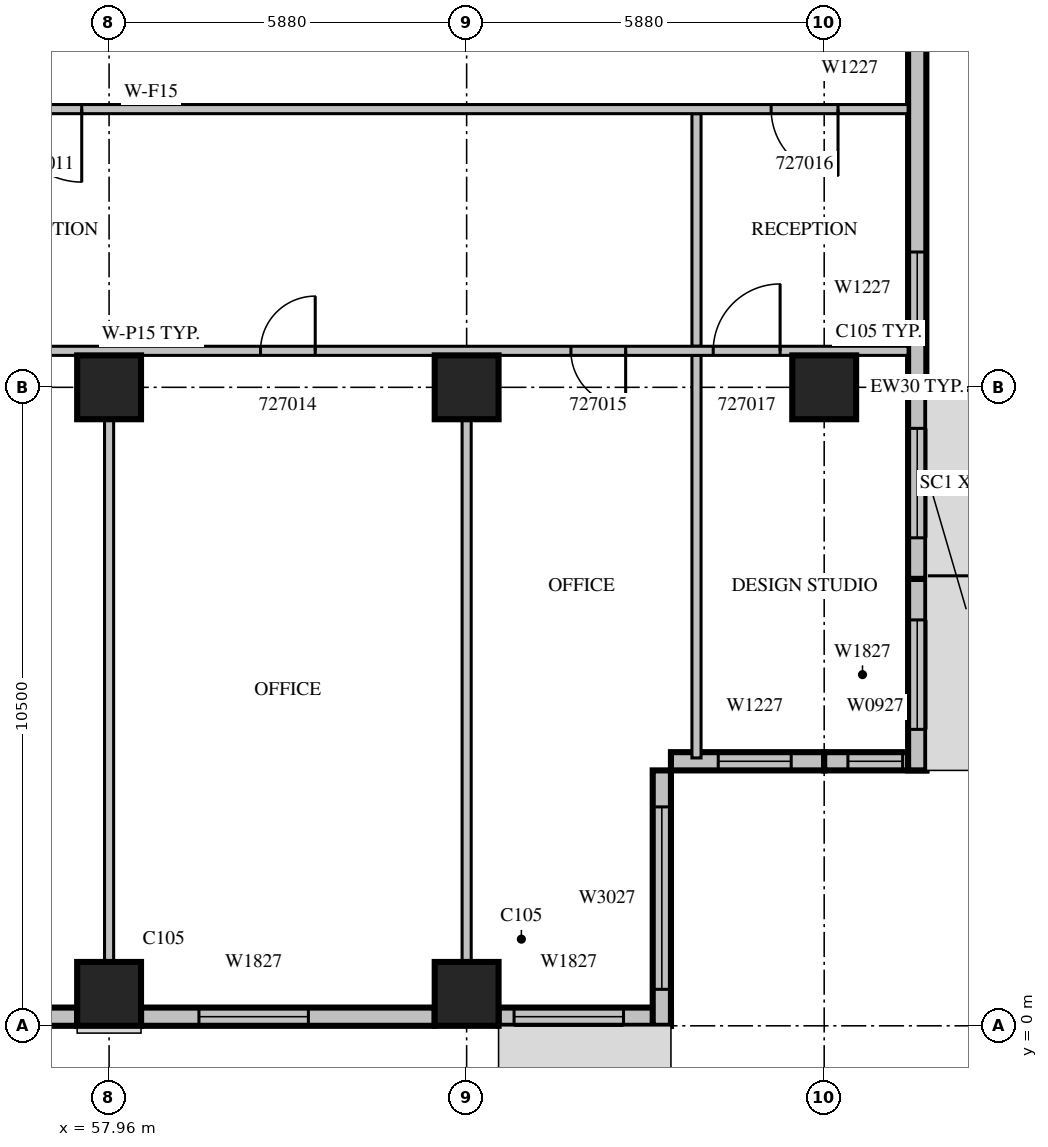
"""IFC4 building model, lengths in metres.
Left out: names, types, materials, properties, quantities, classifications, styles, units other than length and angle.
Written with IfcOpenShell. Run it as: python <this file> out.ifc"""

import sys

from ifc_helpers import new_model, si_unit, direction, frame, frame_2d, origin, origin_2d, place, context, subcontext, project, spatial, rectangle, extrude, source, transform, mapped, element, fill, save


model = new_model("IFC4")
c1 = context("Model", 3, precision=1e-05, world=origin(), true_north=direction((0.0, 1.0)))
c2 = subcontext(c1, "Body", "Model", "MODEL_VIEW")
j1 = project(units=[si_unit("LENGTHUNIT", "METRE"), si_unit("PLANEANGLEUNIT", "RADIAN")], contexts=[c1])
p1 = place(None, origin())
s1 = spatial("IfcSite", under=j1, at=p1, CompositionType="ELEMENT")
p2 = place(p1, origin())
s2 = spatial("IfcBuilding", under=s1, at=p2, CompositionType="ELEMENT")
p3 = place(p2, frame((0.0, 0.0, 124.5)))
s3 = spatial("IfcBuildingStorey", under=s2, at=p3, CompositionType="ELEMENT", Elevation=124.5)
m1 = source(origin(), c2, "Body", "SweptSolid", [
    extrude(rectangle(XDim=1.05, YDim=1.05, at=origin_2d()), origin(), (0.0, 0.0, 1.0), 4.2),
])
for number, where, z_axis, x_axis in (
    (1, (57.96, 0.525, 0.0), (0.0, 0.0, 1.0), (1.0, 0.0, 0.0)),
    (2, (63.84, 0.525, 0.0), (0.0, 0.0, 1.0), (1.0, 0.0, 0.0)),
    (3, (57.96, 10.5, 0.0), (0.0, 0.0, 1.0), (1.0, 0.0, 0.0)),
    (4, (63.84, 10.5, 0.0), (0.0, 0.0, 1.0), (1.0, 0.0, 0.0)),
    (5, (69.72, 10.5, 0.0), (0.0, 0.0, 1.0), (1.0, 0.0, 0.0)),
):
    element("IfcColumn", number, at=place(p3, frame(where, z_axis=z_axis, x_axis=x_axis)), inside=s3, PredefinedType="COLUMN", context=c2, shape_type="MappedRepresentation", body=[
        mapped(m1, transform((0.0, 0.0, 0.0), scale=1.0)),
    ])
m2 = source(origin(), c2, "Body", "SweptSolid", [
    extrude(rectangle(XDim=4.83, YDim=0.3, at=frame_2d((2.415, 0.0))), origin(), (0.0, 0.0, 1.0), 3.8),
])
p4 = place(p3, frame((52.605, 0.15, 0.0), z_axis=(0.0, 0.0, 1.0), x_axis=(1.0, 0.0, 0.0)))
e6 = element("IfcWall", 6, at=p4, inside=s3, PredefinedType="STANDARD", context=c2, shape_type="MappedRepresentation", body=[
    mapped(m2, transform((0.0, 0.0, 0.0), scale=1.0)),
])
m3 = source(origin(), c2, "Body", "SweptSolid", [
    extrude(rectangle(XDim=3.6, YDim=2.7, at=frame_2d((1.8, 1.35))), frame((0.0, 0.16, 0.0), z_axis=(0.0, -1.0, 0.0), x_axis=(1.0, 0.0, 0.0)), (0.0, 0.0, 1.0), 0.32),
])
p5 = place(p4, frame((0.615, 0.0, 0.6)))
e7 = element("IfcOpeningElement", 7, at=p5, cuts=e6, PredefinedType="OPENING", context=c2, shape_type="MappedRepresentation", body=[
    mapped(m3, transform((0.0, 0.0, 0.0), scale=1.0)),
])
p6 = place(p3, frame((58.485, 0.15, 0.0), z_axis=(0.0, 0.0, 1.0), x_axis=(1.0, 0.0, 0.0)))
e8 = element("IfcWall", 8, at=p6, inside=s3, PredefinedType="STANDARD", context=c2, shape_type="MappedRepresentation", body=[
    mapped(m2, transform((0.0, 0.0, 0.0), scale=1.0)),
])
m4 = source(origin(), c2, "Body", "SweptSolid", [
    extrude(rectangle(XDim=1.8, YDim=2.7, at=frame_2d((0.9, 1.35))), frame((0.0, 0.16, 0.0), z_axis=(0.0, -1.0, 0.0), x_axis=(1.0, 0.0, 0.0)), (0.0, 0.0, 1.0), 0.32),
])
p7 = place(p6, frame((0.953, 0.0, 0.6)))
e9 = element("IfcOpeningElement", 9, at=p7, cuts=e8, PredefinedType="OPENING", context=c2, shape_type="MappedRepresentation", body=[
    mapped(m4, transform((0.0, 0.0, 0.0), scale=1.0)),
])
m5 = source(origin(), c2, "Body", "SweptSolid", [
    extrude(rectangle(XDim=2.835, YDim=0.3, at=frame_2d((1.417, 0.0))), origin(), (0.0, 0.0, 1.0), 3.8),
])
p8 = place(p3, frame((64.365, 0.15, 0.0), z_axis=(0.0, 0.0, 1.0), x_axis=(1.0, 0.0, 0.0)))
e10 = element("IfcWall", 10, at=p8, inside=s3, PredefinedType="STANDARD", context=c2, shape_type="MappedRepresentation", body=[
    mapped(m5, transform((0.0, 0.0, 0.0), scale=1.0)),
])
p9 = place(p8, frame((0.255, 0.0, 0.6)))
e11 = element("IfcOpeningElement", 11, at=p9, cuts=e10, PredefinedType="OPENING", context=c2, shape_type="MappedRepresentation", body=[
    mapped(m4, transform((0.0, 0.0, 0.0), scale=1.0)),
])
m6 = source(origin(), c2, "Body", "SweptSolid", [
    extrude(rectangle(XDim=4.2, YDim=0.3, at=frame_2d((2.1, 0.0))), origin(), (0.0, 0.0, 1.0), 3.8),
])
p10 = place(p3, frame((67.05, 0.0, 0.0), z_axis=(0.0, 0.0, 1.0), x_axis=(0.0, 1.0, 0.0)))
e12 = element("IfcWall", 12, at=p10, inside=s3, PredefinedType="STANDARD", context=c2, shape_type="MappedRepresentation", body=[
    mapped(m6, transform((0.0, 0.0, 0.0), scale=1.0)),
])
m7 = source(origin(), c2, "Body", "SweptSolid", [
    extrude(rectangle(XDim=3.0, YDim=2.7, at=frame_2d((1.5, 1.35))), frame((0.0, 0.16, 0.0), z_axis=(0.0, -1.0, 0.0), x_axis=(1.0, 0.0, 0.0)), (0.0, 0.0, 1.0), 0.32),
])
p11 = place(p10, frame((0.6, 0.0, 0.6)))
e13 = element("IfcOpeningElement", 13, at=p11, cuts=e12, PredefinedType="OPENING", context=c2, shape_type="MappedRepresentation", body=[
    mapped(m7, transform((0.0, 0.0, 0.0), scale=1.0)),
])
m8 = source(origin(), c2, "Body", "SweptSolid", [
    extrude(rectangle(XDim=2.52, YDim=0.3, at=frame_2d((1.26, 0.0))), origin(), (0.0, 0.0, 1.0), 3.8),
])
p12 = place(p3, frame((67.2, 4.35, 0.0), z_axis=(0.0, 0.0, 1.0), x_axis=(1.0, 0.0, 0.0)))
e14 = element("IfcWall", 14, at=p12, inside=s3, PredefinedType="STANDARD", context=c2, shape_type="MappedRepresentation", body=[
    mapped(m8, transform((0.0, 0.0, 0.0), scale=1.0)),
])
m9 = source(origin(), c2, "Body", "SweptSolid", [
    extrude(rectangle(XDim=1.2, YDim=2.7, at=frame_2d((0.6, 1.35))), frame((0.0, 0.16, 0.0), z_axis=(0.0, -1.0, 0.0), x_axis=(1.0, 0.0, 0.0)), (0.0, 0.0, 1.0), 0.32),
])
p13 = place(p12, frame((0.777, 0.0, 0.6)))
e15 = element("IfcOpeningElement", 15, at=p13, cuts=e14, PredefinedType="OPENING", context=c2, shape_type="MappedRepresentation", body=[
    mapped(m9, transform((0.0, 0.0, 0.0), scale=1.0)),
])
m10 = source(origin(), c2, "Body", "SweptSolid", [
    extrude(rectangle(XDim=1.68, YDim=0.3, at=frame_2d((0.84, 0.0))), origin(), (0.0, 0.0, 1.0), 3.8),
])
p14 = place(p3, frame((69.72, 4.35, 0.0), z_axis=(0.0, 0.0, 1.0), x_axis=(1.0, 0.0, 0.0)))
e16 = element("IfcWall", 16, at=p14, inside=s3, PredefinedType="STANDARD", context=c2, shape_type="MappedRepresentation", body=[
    mapped(m10, transform((0.0, 0.0, 0.0), scale=1.0)),
])
m11 = source(origin(), c2, "Body", "SweptSolid", [
    extrude(rectangle(XDim=0.9, YDim=2.7, at=frame_2d((0.45, 1.35))), frame((0.0, 0.16, 0.0), z_axis=(0.0, -1.0, 0.0), x_axis=(1.0, 0.0, 0.0)), (0.0, 0.0, 1.0), 0.32),
])
p15 = place(p14, frame((0.39, 0.0, 0.6)))
e17 = element("IfcOpeningElement", 17, at=p15, cuts=e16, PredefinedType="OPENING", context=c2, shape_type="MappedRepresentation", body=[
    mapped(m11, transform((0.0, 0.0, 0.0), scale=1.0)),
])
m12 = source(origin(), c2, "Body", "SweptSolid", [
    extrude(rectangle(XDim=3.15, YDim=0.3, at=frame_2d((1.575, 0.0))), origin(), (0.0, 0.0, 1.0), 3.8),
])
p16 = place(p3, frame((71.25, 4.2, 0.0), z_axis=(0.0, 0.0, 1.0), x_axis=(0.0, 1.0, 0.0)))
e18 = element("IfcWall", 18, at=p16, inside=s3, PredefinedType="STANDARD", context=c2, shape_type="MappedRepresentation", body=[
    mapped(m12, transform((0.0, 0.0, 0.0), scale=1.0)),
])
p17 = place(p16, frame((0.675, 0.0, 0.6)))
e19 = element("IfcOpeningElement", 19, at=p17, cuts=e18, PredefinedType="OPENING", context=c2, shape_type="MappedRepresentation", body=[
    mapped(m4, transform((0.0, 0.0, 0.0), scale=1.0)),
])
p18 = place(p3, frame((71.25, 7.35, 0.0), z_axis=(0.0, 0.0, 1.0), x_axis=(0.0, 1.0, 0.0)))
e20 = element("IfcWall", 20, at=p18, inside=s3, PredefinedType="STANDARD", context=c2, shape_type="MappedRepresentation", body=[
    mapped(m12, transform((0.0, 0.0, 0.0), scale=1.0)),
])
m13 = source(origin(), c2, "Body", "SweptSolid", [
    extrude(rectangle(XDim=1.8, YDim=2.4, at=frame_2d((0.9, 1.2))), frame((0.0, 0.16, 0.0), z_axis=(0.0, -1.0, 0.0), x_axis=(1.0, 0.0, 0.0)), (0.0, 0.0, 1.0), 0.32),
])
p19 = place(p18, frame((0.675, 0.0, 0.0)))
e21 = element("IfcOpeningElement", 21, at=p19, cuts=e20, PredefinedType="OPENING", context=c2, shape_type="MappedRepresentation", body=[
    mapped(m13, transform((0.0, 0.0, 0.0), scale=1.0)),
])
m14 = source(origin(), c2, "Body", "SweptSolid", [
    extrude(rectangle(XDim=6.3, YDim=0.3, at=frame_2d((3.15, 0.0))), origin(), (0.0, 0.0, 1.0), 3.8),
])
p20 = place(p3, frame((71.25, 10.5, 0.0), z_axis=(0.0, 0.0, 1.0), x_axis=(0.0, 1.0, 0.0)))
e22 = element("IfcWall", 22, at=p20, inside=s3, PredefinedType="STANDARD", context=c2, shape_type="MappedRepresentation", body=[
    mapped(m14, transform((0.0, 0.0, 0.0), scale=1.0)),
])
p21 = place(p20, frame((1.025, 0.0, 0.6)))
e23 = element("IfcOpeningElement", 23, at=p21, cuts=e22, PredefinedType="OPENING", context=c2, shape_type="MappedRepresentation", body=[
    mapped(m9, transform((0.0, 0.0, 0.0), scale=1.0)),
])
m15 = source(origin(), c2, "Body", "SweptSolid", [
    extrude(rectangle(XDim=8.927, YDim=0.15, at=frame_2d((4.463, 0.0))), origin(), (0.0, 0.0, 1.0), 3.8),
])
for number, where, z_axis, x_axis in (
    (24, (57.96, 1.049, 0.0), (0.0, 0.0, 1.0), (0.0, 1.0, 0.0)),
    (25, (63.84, 1.049, 0.0), (0.0, 0.0, 1.0), (0.0, 1.0, 0.0)),
):
    element("IfcWall", number, at=place(p3, frame(where, z_axis=z_axis, x_axis=x_axis)), inside=s3, PredefinedType="PARTITIONING", context=c2, shape_type="MappedRepresentation", body=[
        mapped(m15, transform((0.0, 0.0, 0.0), scale=1.0)),
    ])
m16 = source(origin(), c2, "Body", "SweptSolid", [
    extrude(rectangle(XDim=6.62, YDim=0.15, at=frame_2d((3.31, 0.0))), origin(), (0.0, 0.0, 1.0), 3.8),
])
p22 = place(p3, frame((67.62, 4.405, 0.0), z_axis=(0.0, 0.0, 1.0), x_axis=(0.0, 1.0, 0.0)))
e26 = element("IfcWall", 26, at=p22, inside=s3, PredefinedType="PARTITIONING", context=c2, shape_type="MappedRepresentation", body=[
    mapped(m16, transform((0.0, 0.0, 0.0), scale=1.0)),
])
m17 = source(origin(), c2, "Body", "SweptSolid", [
    extrude(rectangle(XDim=3.825, YDim=0.15, at=frame_2d((1.913, 0.0))), origin(), (0.0, 0.0, 1.0), 3.8),
])
p23 = place(p3, frame((67.62, 11.175, 0.0), z_axis=(0.0, 0.0, 1.0), x_axis=(0.0, 1.0, 0.0)))
e27 = element("IfcWall", 27, at=p23, inside=s3, PredefinedType="PARTITIONING", context=c2, shape_type="MappedRepresentation", body=[
    mapped(m17, transform((0.0, 0.0, 0.0), scale=1.0)),
])
m18 = source(origin(), c2, "Body", "SweptSolid", [
    extrude(rectangle(XDim=24.9, YDim=0.15, at=frame_2d((12.45, 0.0))), origin(), (0.0, 0.0, 1.0), 3.8),
])
p24 = place(p3, frame((71.1, 11.1, 0.0), z_axis=(0.0, 0.0, 1.0), x_axis=(-1.0, 0.0, 0.0)))
e28 = element("IfcWall", 28, at=p24, inside=s3, PredefinedType="PARTITIONING", context=c2, shape_type="MappedRepresentation", body=[
    mapped(m18, transform((0.0, 0.0, 0.0), scale=1.0)),
])
m19 = source(origin(), c2, "Body", "SweptSolid", [
    extrude(rectangle(XDim=0.9, YDim=2.1, at=frame_2d((0.45, 1.05))), frame((0.0, 0.085, 0.0), z_axis=(0.0, -1.0, 0.0), x_axis=(1.0, 0.0, 0.0)), (0.0, 0.0, 1.0), 0.17),
])
p25 = place(p24, frame((21.51, 0.0, 0.0)))
e29 = element("IfcOpeningElement", 29, at=p25, cuts=e28, PredefinedType="OPENING", context=c2, shape_type="MappedRepresentation", body=[
    mapped(m19, transform((0.0, 0.0, 0.0), scale=1.0)),
])
p26 = place(p24, frame((15.63, 0.0, 0.0)))
e30 = element("IfcOpeningElement", 30, at=p26, cuts=e28, PredefinedType="OPENING", context=c2, shape_type="MappedRepresentation", body=[
    mapped(m19, transform((0.0, 0.0, 0.0), scale=1.0)),
])
p27 = place(p24, frame((9.75, 0.0, 0.0)))
e31 = element("IfcOpeningElement", 31, at=p27, cuts=e28, PredefinedType="OPENING", context=c2, shape_type="MappedRepresentation", body=[
    mapped(m19, transform((0.0, 0.0, 0.0), scale=1.0)),
])
p28 = place(p24, frame((4.645, 0.0, 0.0)))
e32 = element("IfcOpeningElement", 32, at=p28, cuts=e28, PredefinedType="OPENING", context=c2, shape_type="MappedRepresentation", body=[
    mapped(m19, transform((0.0, 0.0, 0.0), scale=1.0)),
])
m20 = source(origin(), c2, "Body", "SweptSolid", [
    extrude(rectangle(XDim=1.1, YDim=2.1, at=frame_2d((0.55, 1.05))), frame((0.0, 0.085, 0.0), z_axis=(0.0, -1.0, 0.0), x_axis=(1.0, 0.0, 0.0)), (0.0, 0.0, 1.0), 0.17),
])
p29 = place(p24, frame((2.105, 0.0, 0.0)))
e33 = element("IfcOpeningElement", 33, at=p29, cuts=e28, PredefinedType="OPENING", context=c2, shape_type="MappedRepresentation", body=[
    mapped(m20, transform((0.0, 0.0, 0.0), scale=1.0)),
])
p30 = place(p3, frame((71.1, 15.075, 0.0), z_axis=(0.0, 0.0, 1.0), x_axis=(-1.0, 0.0, 0.0)))
e34 = element("IfcWall", 34, at=p30, inside=s3, PredefinedType="PARTITIONING", context=c2, shape_type="MappedRepresentation", body=[
    mapped(m18, transform((0.0, 0.0, 0.0), scale=1.0)),
])
m21 = source(origin(), c2, "Body", "SweptSolid", [
    extrude(rectangle(XDim=1.2, YDim=2.1, at=frame_2d((0.6, 1.05))), frame((0.0, 0.085, 0.0), z_axis=(0.0, -1.0, 0.0), x_axis=(1.0, 0.0, 0.0)), (0.0, 0.0, 1.0), 0.17),
])
p31 = place(p30, frame((13.59, 0.0, 0.0)))
e35 = element("IfcOpeningElement", 35, at=p31, cuts=e34, PredefinedType="OPENING", context=c2, shape_type="MappedRepresentation", body=[
    mapped(m21, transform((0.0, 0.0, 0.0), scale=1.0)),
])
p32 = place(p30, frame((1.153, 0.0, 0.0)))
e36 = element("IfcOpeningElement", 36, at=p32, cuts=e34, PredefinedType="OPENING", context=c2, shape_type="MappedRepresentation", body=[
    mapped(m20, transform((0.0, 0.0, 0.0), scale=1.0)),
])
m22 = source(origin(), c2, "Body", "SweptSolid", [
    extrude(rectangle(XDim=1.8, YDim=2.7, at=frame_2d((0.9, 1.35))), frame((0.0, 0.03, 0.0), z_axis=(0.0, -1.0, 0.0), x_axis=(1.0, 0.0, 0.0)), (0.0, 0.0, 1.0), 0.06),
])
p33 = place(p7, origin())
e37 = element("IfcWindow", 37, at=p33, inside=s3, PartitioningType="SINGLE_PANEL", PredefinedType="WINDOW", context=c2, shape_type="MappedRepresentation", body=[
    mapped(m22, transform((0.0, 0.0, 0.0), scale=1.0)),
])
fill(e9, e37)
p34 = place(p9, origin())
e38 = element("IfcWindow", 38, at=p34, inside=s3, PartitioningType="SINGLE_PANEL", PredefinedType="WINDOW", context=c2, shape_type="MappedRepresentation", body=[
    mapped(m22, transform((0.0, 0.0, 0.0), scale=1.0)),
])
fill(e11, e38)
m23 = source(origin(), c2, "Body", "SweptSolid", [
    extrude(rectangle(XDim=3.0, YDim=2.7, at=frame_2d((1.5, 1.35))), frame((0.0, 0.03, 0.0), z_axis=(0.0, -1.0, 0.0), x_axis=(1.0, 0.0, 0.0)), (0.0, 0.0, 1.0), 0.06),
])
p35 = place(p11, origin())
e39 = element("IfcWindow", 39, at=p35, inside=s3, PartitioningType="SINGLE_PANEL", PredefinedType="WINDOW", context=c2, shape_type="MappedRepresentation", body=[
    mapped(m23, transform((0.0, 0.0, 0.0), scale=1.0)),
])
fill(e13, e39)
m24 = source(origin(), c2, "Body", "SweptSolid", [
    extrude(rectangle(XDim=1.2, YDim=2.7, at=frame_2d((0.6, 1.35))), frame((0.0, 0.03, 0.0), z_axis=(0.0, -1.0, 0.0), x_axis=(1.0, 0.0, 0.0)), (0.0, 0.0, 1.0), 0.06),
])
p36 = place(p13, origin())
e40 = element("IfcWindow", 40, at=p36, inside=s3, PartitioningType="SINGLE_PANEL", PredefinedType="WINDOW", context=c2, shape_type="MappedRepresentation", body=[
    mapped(m24, transform((0.0, 0.0, 0.0), scale=1.0)),
])
fill(e15, e40)
m25 = source(origin(), c2, "Body", "SweptSolid", [
    extrude(rectangle(XDim=0.9, YDim=2.7, at=frame_2d((0.45, 1.35))), frame((0.0, 0.03, 0.0), z_axis=(0.0, -1.0, 0.0), x_axis=(1.0, 0.0, 0.0)), (0.0, 0.0, 1.0), 0.06),
])
p37 = place(p15, origin())
e41 = element("IfcWindow", 41, at=p37, inside=s3, PartitioningType="SINGLE_PANEL", PredefinedType="WINDOW", context=c2, shape_type="MappedRepresentation", body=[
    mapped(m25, transform((0.0, 0.0, 0.0), scale=1.0)),
])
fill(e17, e41)
p38 = place(p17, origin())
e42 = element("IfcWindow", 42, at=p38, inside=s3, PartitioningType="SINGLE_PANEL", PredefinedType="WINDOW", context=c2, shape_type="MappedRepresentation", body=[
    mapped(m22, transform((0.0, 0.0, 0.0), scale=1.0)),
])
fill(e19, e42)
m26 = source(origin(), c2, "Body", "SweptSolid", [
    extrude(rectangle(XDim=1.8, YDim=2.4, at=frame_2d((0.9, 1.2))), frame((0.0, 0.025, 0.0), z_axis=(0.0, -1.0, 0.0), x_axis=(1.0, 0.0, 0.0)), (0.0, 0.0, 1.0), 0.05),
])
p39 = place(p19, origin())
e43 = element("IfcDoor", 43, at=p39, inside=s3, OperationType="SLIDING_TO_LEFT", PredefinedType="DOOR", context=c2, shape_type="MappedRepresentation", body=[
    mapped(m26, transform((0.0, 0.0, 0.0), scale=1.0)),
])
fill(e21, e43)
p40 = place(p21, origin())
e44 = element("IfcWindow", 44, at=p40, inside=s3, PartitioningType="SINGLE_PANEL", PredefinedType="WINDOW", context=c2, shape_type="MappedRepresentation", body=[
    mapped(m24, transform((0.0, 0.0, 0.0), scale=1.0)),
])
fill(e23, e44)
m27 = source(origin(), c2, "Body", "SweptSolid", [
    extrude(rectangle(XDim=1.2, YDim=2.1, at=frame_2d((0.6, 1.05))), frame((0.0, 0.025, 0.0), z_axis=(0.0, -1.0, 0.0), x_axis=(1.0, 0.0, 0.0)), (0.0, 0.0, 1.0), 0.05),
])
p41 = place(p31, origin())
e45 = element("IfcDoor", 45, at=p41, inside=s3, OperationType="SINGLE_SWING_LEFT", PredefinedType="DOOR", context=c2, shape_type="MappedRepresentation", body=[
    mapped(m27, transform((0.0, 0.0, 0.0), scale=1.0)),
])
fill(e35, e45)
m28 = source(origin(), c2, "Body", "SweptSolid", [
    extrude(rectangle(XDim=0.9, YDim=2.1, at=frame_2d((0.45, 1.05))), frame((0.0, 0.025, 0.0), z_axis=(0.0, -1.0, 0.0), x_axis=(1.0, 0.0, 0.0)), (0.0, 0.0, 1.0), 0.05),
])
p42 = place(p27, origin())
e46 = element("IfcDoor", 46, at=p42, inside=s3, OperationType="SINGLE_SWING_RIGHT", PredefinedType="DOOR", context=c2, shape_type="MappedRepresentation", body=[
    mapped(m28, transform((0.0, 0.0, 0.0), scale=1.0)),
])
fill(e31, e46)
p43 = place(p28, origin())
e47 = element("IfcDoor", 47, at=p43, inside=s3, OperationType="SINGLE_SWING_LEFT", PredefinedType="DOOR", context=c2, shape_type="MappedRepresentation", body=[
    mapped(m28, transform((0.0, 0.0, 0.0), scale=1.0)),
])
fill(e32, e47)
m29 = source(origin(), c2, "Body", "SweptSolid", [
    extrude(rectangle(XDim=1.1, YDim=2.1, at=frame_2d((0.55, 1.05))), frame((0.0, 0.025, 0.0), z_axis=(0.0, -1.0, 0.0), x_axis=(1.0, 0.0, 0.0)), (0.0, 0.0, 1.0), 0.05),
])
p44 = place(p32, origin())
e48 = element("IfcDoor", 48, at=p44, inside=s3, OperationType="SINGLE_SWING_LEFT", PredefinedType="DOOR", context=c2, shape_type="MappedRepresentation", body=[
    mapped(m29, transform((0.0, 0.0, 0.0), scale=1.0)),
])
fill(e36, e48)
p45 = place(p29, origin())
e49 = element("IfcDoor", 49, at=p45, inside=s3, OperationType="SINGLE_SWING_RIGHT", PredefinedType="DOOR", context=c2, shape_type="MappedRepresentation", body=[
    mapped(m29, transform((0.0, 0.0, 0.0), scale=1.0)),
])
fill(e33, e49)
save(model, sys.argv[1])
